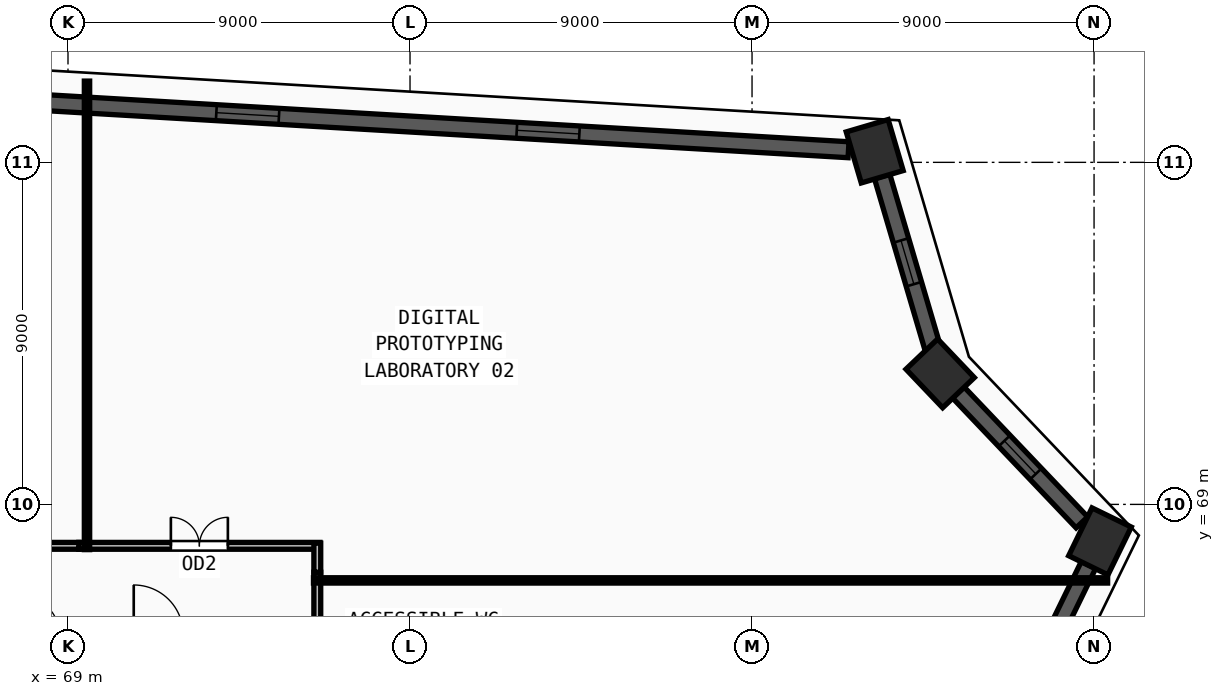
"""IFC4 building model, lengths in metres.
Left out: names, types, materials, properties, quantities, classifications, styles, units other than length and angle.
Written with IfcOpenShell. Run it as: python <this file> out.ifc"""

import sys

from ifc_helpers import new_model, si_unit, direction, frame, frame_2d, origin, origin_2d, place, context, subcontext, project, spatial, rectangle, extrude, source, transform, mapped, element, fill, save


model = new_model("IFC4")
c1 = context("Model", 3, precision=1e-05, world=origin(), true_north=direction((0.0, 1.0)))
c2 = subcontext(c1, "Body", "Model", "MODEL_VIEW")
j1 = project(units=[si_unit("LENGTHUNIT", "METRE"), si_unit("PLANEANGLEUNIT", "RADIAN")], contexts=[c1])
p1 = place(None, origin())
s1 = spatial("IfcSite", under=j1, at=p1, CompositionType="ELEMENT")
p2 = place(p1, origin())
s2 = spatial("IfcBuilding", under=s1, at=p2, CompositionType="ELEMENT")
p3 = place(p2, frame((0.0, 0.0, 124.5)))
s3 = spatial("IfcBuildingStorey", under=s2, at=p3, CompositionType="ELEMENT", Elevation=124.5)
m1 = source(origin(), c2, "Body", "SweptSolid", [
    extrude(rectangle(XDim=1.4, YDim=1.15, at=origin_2d()), origin(), (0.0, 0.0, 1.0), 3.75),
])
for number, where, z_axis, x_axis in (
    (1, (90.228, 78.292, 0.0), (0.0, 0.0, 1.0), (-0.283, 0.959, 0.0)),
    (2, (91.95, 72.447, 0.0), (0.0, 0.0, 1.0), (-0.689, 0.724, 0.0)),
    (3, (96.156, 68.027, 0.0), (0.0, 0.0, 1.0), (0.438, 0.899, 0.0)),
):
    element("IfcColumn", number, at=place(p3, frame(where, z_axis=z_axis, x_axis=x_axis)), inside=s3, PredefinedType="COLUMN", context=c2, shape_type="MappedRepresentation", body=[
        mapped(m1, transform((0.0, 0.0, 0.0), x_axis=(1.0, 0.0, 0.0), y_axis=(0.0, 1.0, 0.0), z_axis=(0.0, 0.0, 1.0), scale=1.0)),
    ])
p4 = place(p3, frame((84.401, 43.91, 0.0), z_axis=(0.0, 0.0, 1.0), x_axis=(0.438149799109, 0.898901971041, 0.0)))
e4 = element("IfcWall", 4, at=p4, inside=s3, PredefinedType="SOLIDWALL", context=c2, shape_type="SweptSolid", body=[
    extrude(rectangle(XDim=26.14, YDim=0.42, at=frame_2d((13.07, 0.0))), origin(), (0.0, 0.0, 1.0), 3.57),
])
m2 = source(origin(), c2, "Body", "SweptSolid", [
    extrude(rectangle(XDim=1.65, YDim=1.95, at=frame_2d((0.825, 0.975))), frame((0.0, 0.22, 0.0), z_axis=(0.0, -1.0, 0.0), x_axis=(1.0, 0.0, 0.0)), (0.0, 0.0, 1.0), 0.44),
])
p5 = place(p4, frame((5.71, 0.0, 0.55)))
e5 = element("IfcOpeningElement", 5, at=p5, cuts=e4, PredefinedType="OPENING", context=c2, shape_type="MappedRepresentation", body=[
    mapped(m2, transform((0.0, 0.0, 0.0), x_axis=(1.0, 0.0, 0.0), y_axis=(0.0, 1.0, 0.0), z_axis=(0.0, 0.0, 1.0), scale=1.0)),
])
p6 = place(p4, frame((18.78, 0.0, 0.55)))
e6 = element("IfcOpeningElement", 6, at=p6, cuts=e4, PredefinedType="OPENING", context=c2, shape_type="MappedRepresentation", body=[
    mapped(m2, transform((0.0, 0.0, 0.0), x_axis=(1.0, 0.0, 0.0), y_axis=(0.0, 1.0, 0.0), z_axis=(0.0, 0.0, 1.0), scale=1.0)),
])
p7 = place(p3, frame((95.68, 68.527, 0.0), z_axis=(0.0, 0.0, 1.0), x_axis=(-0.689303823825, 0.724472386265, 0.0)))
e7 = element("IfcWall", 7, at=p7, inside=s3, PredefinedType="SOLIDWALL", context=c2, shape_type="SweptSolid", body=[
    extrude(rectangle(XDim=4.72, YDim=0.42, at=frame_2d((2.36, 0.0))), origin(), (0.0, 0.0, 1.0), 3.57),
])
m3 = source(origin(), c2, "Body", "SweptSolid", [
    extrude(rectangle(XDim=1.2, YDim=1.9, at=frame_2d((0.6, 0.95))), frame((0.0, 0.22, 0.0), z_axis=(0.0, -1.0, 0.0), x_axis=(1.0, 0.0, 0.0)), (0.0, 0.0, 1.0), 0.44),
])
p8 = place(p7, frame((1.76, 0.0, 0.55)))
e8 = element("IfcOpeningElement", 8, at=p8, cuts=e7, PredefinedType="OPENING", context=c2, shape_type="MappedRepresentation", body=[
    mapped(m3, transform((0.0, 0.0, 0.0), x_axis=(1.0, 0.0, 0.0), y_axis=(0.0, 1.0, 0.0), z_axis=(0.0, 0.0, 1.0), scale=1.0)),
])
p9 = place(p3, frame((91.755, 73.109, 0.0), z_axis=(0.0, 0.0, 1.0), x_axis=(-0.282572950825, 0.959245811803, 0.0)))
e9 = element("IfcWall", 9, at=p9, inside=s3, PredefinedType="SOLIDWALL", context=c2, shape_type="SweptSolid", body=[
    extrude(rectangle(XDim=4.713, YDim=0.42, at=frame_2d((2.356, 0.0))), origin(), (0.0, 0.0, 1.0), 3.57),
])
p10 = place(p9, frame((1.757, 0.0, 0.55)))
e10 = element("IfcOpeningElement", 10, at=p10, cuts=e9, PredefinedType="OPENING", context=c2, shape_type="MappedRepresentation", body=[
    mapped(m3, transform((0.0, 0.0, 0.0), x_axis=(1.0, 0.0, 0.0), y_axis=(0.0, 1.0, 0.0), z_axis=(0.0, 0.0, 1.0), scale=1.0)),
])
p11 = place(p3, frame((89.539, 78.332, 0.0), z_axis=(0.0, 0.0, 1.0), x_axis=(-0.998285887644, 0.058525947494, 0.0)))
e11 = element("IfcWall", 11, at=p11, inside=s3, PredefinedType="SOLIDWALL", context=c2, shape_type="SweptSolid", body=[
    extrude(rectangle(XDim=31.678, YDim=0.42, at=frame_2d((15.839, 0.0))), origin(), (0.0, 0.0, 1.0), 3.57),
])
p12 = place(p11, frame((7.095, 0.0, 0.55)))
e12 = element("IfcOpeningElement", 12, at=p12, cuts=e11, PredefinedType="OPENING", context=c2, shape_type="MappedRepresentation", body=[
    mapped(m2, transform((0.0, 0.0, 0.0), x_axis=(1.0, 0.0, 0.0), y_axis=(0.0, 1.0, 0.0), z_axis=(0.0, 0.0, 1.0), scale=1.0)),
])
p13 = place(p11, frame((15.014, 0.0, 0.55)))
e13 = element("IfcOpeningElement", 13, at=p13, cuts=e11, PredefinedType="OPENING", context=c2, shape_type="MappedRepresentation", body=[
    mapped(m2, transform((0.0, 0.0, 0.0), x_axis=(1.0, 0.0, 0.0), y_axis=(0.0, 1.0, 0.0), z_axis=(0.0, 0.0, 1.0), scale=1.0)),
])
p14 = place(p11, frame((22.934, 0.0, 0.55)))
e14 = element("IfcOpeningElement", 14, at=p14, cuts=e11, PredefinedType="OPENING", context=c2, shape_type="MappedRepresentation", body=[
    mapped(m2, transform((0.0, 0.0, 0.0), x_axis=(1.0, 0.0, 0.0), y_axis=(0.0, 1.0, 0.0), z_axis=(0.0, 0.0, 1.0), scale=1.0)),
])
p15 = place(p3, frame((69.285, 67.91, 0.0), z_axis=(0.0, 0.0, 1.0), x_axis=(1.0, 0.0, 0.0)))
e15 = element("IfcWall", 15, at=p15, inside=s3, PredefinedType="PARTITIONING", context=c2, shape_type="SweptSolid", body=[
    extrude(rectangle(XDim=6.345, YDim=0.18, at=frame_2d((3.172, 0.0))), origin(), (0.0, 0.0, 1.0), 3.57),
])
m4 = source(origin(), c2, "Body", "SweptSolid", [
    extrude(rectangle(XDim=1.5, YDim=2.2, at=frame_2d((0.75, 1.1))), frame((0.0, 0.1, 0.0), z_axis=(0.0, -1.0, 0.0), x_axis=(1.0, 0.0, 0.0)), (0.0, 0.0, 1.0), 0.2),
])
p16 = place(p15, frame((2.422, 0.0, 0.0)))
e16 = element("IfcOpeningElement", 16, at=p16, cuts=e15, PredefinedType="OPENING", context=c2, shape_type="MappedRepresentation", body=[
    mapped(m4, transform((0.0, 0.0, 0.0), x_axis=(1.0, 0.0, 0.0), y_axis=(0.0, 1.0, 0.0), z_axis=(0.0, 0.0, 1.0), scale=1.0)),
])
p17 = place(p3, frame((60.285, 67.91, 0.0), z_axis=(0.0, 0.0, 1.0), x_axis=(1.0, 0.0, 0.0)))
e17 = element("IfcWall", 17, at=p17, inside=s3, PredefinedType="PARTITIONING", context=c2, shape_type="SweptSolid", body=[
    extrude(rectangle(XDim=9.0, YDim=0.18, at=frame_2d((4.5, 0.0))), origin(), (0.0, 0.0, 1.0), 3.57),
])
m5 = source(origin(), c2, "Body", "SweptSolid", [
    extrude(rectangle(XDim=1.0, YDim=2.2, at=frame_2d((0.5, 1.1))), frame((0.0, 0.1, 0.0), z_axis=(0.0, -1.0, 0.0), x_axis=(1.0, 0.0, 0.0)), (0.0, 0.0, 1.0), 0.2),
])
p18 = place(p17, frame((4.0, 0.0, 0.0)))
e18 = element("IfcOpeningElement", 18, at=p18, cuts=e17, PredefinedType="OPENING", context=c2, shape_type="MappedRepresentation", body=[
    mapped(m5, transform((0.0, 0.0, 0.0), x_axis=(1.0, 0.0, 0.0), y_axis=(0.0, 1.0, 0.0), z_axis=(0.0, 0.0, 1.0), scale=1.0)),
])
p19 = place(p3, frame((75.56, 67.215, 0.0), z_axis=(0.0, 0.0, 1.0), x_axis=(0.0, -1.0, 0.0)))
e19 = element("IfcWall", 19, at=p19, inside=s3, PredefinedType="PARTITIONING", context=c2, shape_type="SweptSolid", body=[
    extrude(rectangle(XDim=2.035, YDim=0.18, at=frame_2d((1.018, 0.0))), origin(), (0.0, 0.0, 1.0), 3.57),
])
p20 = place(p3, frame((75.56, 67.98, 0.0), z_axis=(0.0, 0.0, 1.0), x_axis=(0.0, -1.0, 0.0)))
e20 = element("IfcWall", 20, at=p20, inside=s3, PredefinedType="PARTITIONING", context=c2, shape_type="SweptSolid", body=[
    extrude(rectangle(XDim=0.765, YDim=0.18, at=frame_2d((0.382, 0.0))), origin(), (0.0, 0.0, 1.0), 3.57),
])
p21 = place(p3, frame((75.46, 67.0, 0.0), z_axis=(0.0, 0.0, 1.0), x_axis=(1.0, 0.0, 0.0)))
e21 = element("IfcWall", 21, at=p21, inside=s3, PredefinedType="PARTITIONING", context=c2, shape_type="SweptSolid", body=[
    extrude(rectangle(XDim=20.897, YDim=0.14, at=frame_2d((10.448, 0.0))), origin(), (0.0, 0.0, 1.0), 2.755),
])
p22 = place(p3, frame((69.5, 67.81, 0.0), z_axis=(0.0, 0.0, 1.0), x_axis=(0.0, 1.0, 0.0)))
e22 = element("IfcWall", 22, at=p22, inside=s3, PredefinedType="PARTITIONING", context=c2, shape_type="SweptSolid", body=[
    extrude(rectangle(XDim=12.328, YDim=0.14, at=frame_2d((6.164, 0.0))), origin(), (0.0, 0.0, 1.0), 3.57),
])
m6 = source(origin(), c2, "Body", "SweptSolid", [
    extrude(rectangle(XDim=1.2, YDim=1.9, at=frame_2d((0.6, 0.95))), frame((0.0, 0.03, 0.0), z_axis=(0.0, -1.0, 0.0), x_axis=(1.0, 0.0, 0.0)), (0.0, 0.0, 1.0), 0.06),
])
p23 = place(p8, origin())
e23 = element("IfcWindow", 23, at=p23, inside=s3, PartitioningType="SINGLE_PANEL", PredefinedType="WINDOW", context=c2, shape_type="MappedRepresentation", body=[
    mapped(m6, transform((0.0, 0.0, 0.0), x_axis=(1.0, 0.0, 0.0), y_axis=(0.0, 1.0, 0.0), z_axis=(0.0, 0.0, 1.0), scale=1.0)),
])
fill(e8, e23)
p24 = place(p10, origin())
e24 = element("IfcWindow", 24, at=p24, inside=s3, PartitioningType="SINGLE_PANEL", PredefinedType="WINDOW", context=c2, shape_type="MappedRepresentation", body=[
    mapped(m6, transform((0.0, 0.0, 0.0), x_axis=(1.0, 0.0, 0.0), y_axis=(0.0, 1.0, 0.0), z_axis=(0.0, 0.0, 1.0), scale=1.0)),
])
fill(e10, e24)
m7 = source(origin(), c2, "Body", "SweptSolid", [
    extrude(rectangle(XDim=1.65, YDim=1.95, at=frame_2d((0.825, 0.975))), frame((0.0, 0.03, 0.0), z_axis=(0.0, -1.0, 0.0), x_axis=(1.0, 0.0, 0.0)), (0.0, 0.0, 1.0), 0.06),
])
p25 = place(p12, origin())
e25 = element("IfcWindow", 25, at=p25, inside=s3, PartitioningType="DOUBLE_PANEL_VERTICAL", PredefinedType="WINDOW", context=c2, shape_type="MappedRepresentation", body=[
    mapped(m7, transform((0.0, 0.0, 0.0), x_axis=(1.0, 0.0, 0.0), y_axis=(0.0, 1.0, 0.0), z_axis=(0.0, 0.0, 1.0), scale=1.0)),
])
fill(e12, e25)
p26 = place(p13, origin())
e26 = element("IfcWindow", 26, at=p26, inside=s3, PartitioningType="DOUBLE_PANEL_VERTICAL", PredefinedType="WINDOW", context=c2, shape_type="MappedRepresentation", body=[
    mapped(m7, transform((0.0, 0.0, 0.0), x_axis=(1.0, 0.0, 0.0), y_axis=(0.0, 1.0, 0.0), z_axis=(0.0, 0.0, 1.0), scale=1.0)),
])
fill(e13, e26)
m8 = source(origin(), c2, "Body", "SweptSolid", [
    extrude(rectangle(XDim=1.5, YDim=2.2, at=frame_2d((0.75, 1.1))), frame((0.0, 0.025, 0.0), z_axis=(0.0, -1.0, 0.0), x_axis=(1.0, 0.0, 0.0)), (0.0, 0.0, 1.0), 0.05),
])
p27 = place(p16, origin())
e27 = element("IfcDoor", 27, at=p27, inside=s3, OperationType="DOUBLE_DOOR_SINGLE_SWING", PredefinedType="DOOR", context=c2, shape_type="MappedRepresentation", body=[
    mapped(m8, transform((0.0, 0.0, 0.0), x_axis=(1.0, 0.0, 0.0), y_axis=(0.0, 1.0, 0.0), z_axis=(0.0, 0.0, 1.0), scale=1.0)),
])
fill(e16, e27)
save(model, sys.argv[1])
